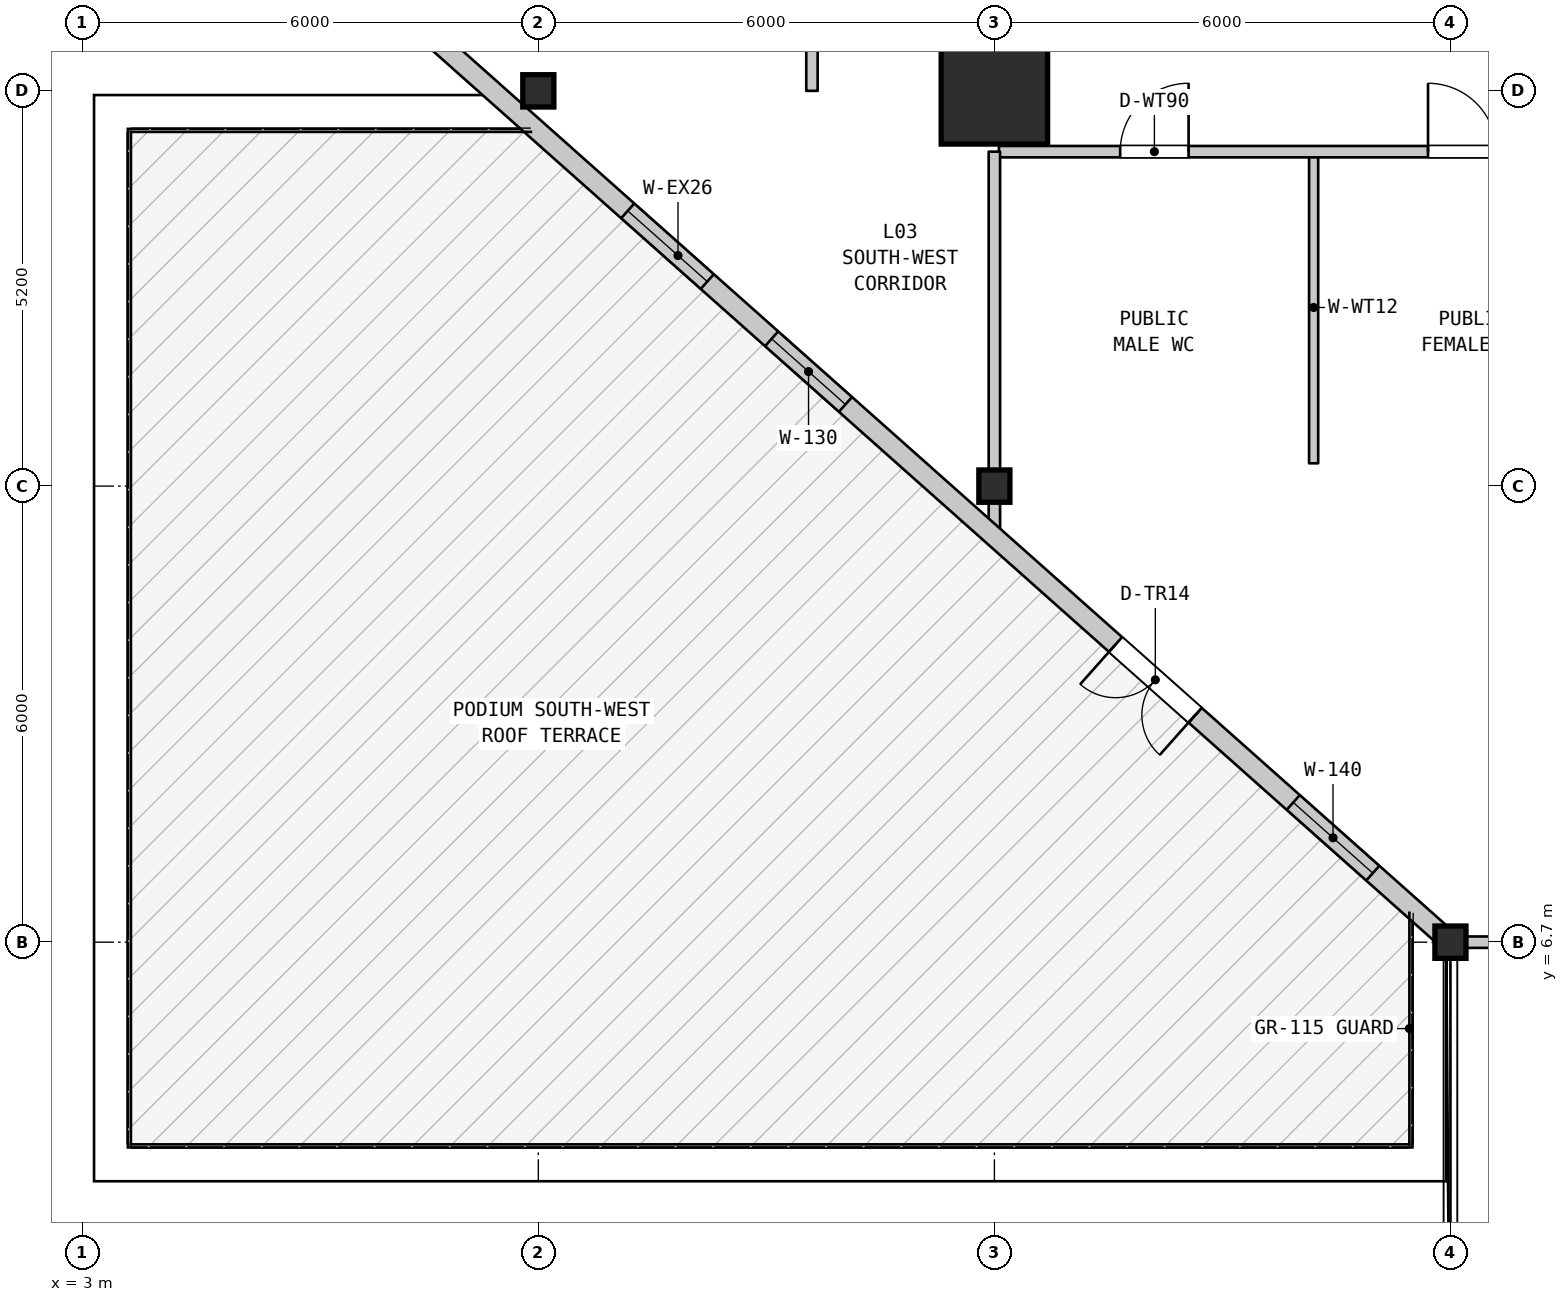
"""IFC4 building model, lengths in metres.
Left out: names, types, materials, properties, quantities, classifications, styles, units other than length and angle.
Written with IfcOpenShell. Run it as: python <this file> out.ifc"""

import sys

from ifc_helpers import new_model, si_unit, direction, frame, frame_2d, origin, origin_2d, place, context, subcontext, project, spatial, rectangle, i_section, extrude, element, fill, save


model = new_model("IFC4")
c1 = context("Model", 3, precision=1e-05, world=origin(), true_north=direction((0.0, 1.0)))
c2 = subcontext(c1, "Body", "Model", "MODEL_VIEW")
j1 = project(units=[si_unit("LENGTHUNIT", "METRE"), si_unit("PLANEANGLEUNIT", "RADIAN")], contexts=[c1])
p1 = place(None, origin())
s1 = spatial("IfcSite", under=j1, at=p1, CompositionType="ELEMENT")
p2 = place(p1, origin())
s2 = spatial("IfcBuilding", under=s1, at=p2, CompositionType="ELEMENT")
p3 = place(p2, frame((0.0, 0.0, 19.0)))
s3 = spatial("IfcBuildingStorey", under=s2, at=p3, CompositionType="ELEMENT", Elevation=19.0)
for number, where, z_axis, x_axis in (
    (1, (9.0, 17.9, 0.0), (0.0, 0.0, 1.0), (1.0, 0.0, 0.0)),
    (2, (15.0, 12.7, 0.0), (0.0, 0.0, 1.0), (1.0, 0.0, 0.0)),
):
    element("IfcColumn", number, at=place(p3, frame(where, z_axis=z_axis, x_axis=x_axis)), inside=s3, PredefinedType="COLUMN", context=c2, shape_type="SweptSolid", body=[
        extrude(i_section(OverallWidth=0.409, OverallDepth=0.425, WebThickness=0.032, FlangeThickness=0.052, FilletRadius=0.015, at=origin_2d()), origin(), (0.0, 0.0, 1.0), 5.0),
    ])
p4 = place(p3, frame((15.0, 17.9, 0.0), z_axis=(0.0, 0.0, 1.0), x_axis=(1.0, 0.0, 0.0)))
e3 = element("IfcColumn", 3, at=p4, inside=s3, PredefinedType="COLUMN", context=c2, shape_type="SweptSolid", body=[
    extrude(rectangle(XDim=1.4, YDim=1.4, at=origin_2d()), origin(), (0.0, 0.0, 1.0), 5.0),
])
p5 = place(p3, frame((21.0, 6.7, 0.0), z_axis=(0.0, 0.0, 1.0), x_axis=(1.0, 0.0, 0.0)))
e4 = element("IfcColumn", 4, at=p5, inside=s3, PredefinedType="COLUMN", context=c2, shape_type="SweptSolid", body=[
    extrude(i_section(OverallWidth=0.409, OverallDepth=0.425, WebThickness=0.032, FlangeThickness=0.052, FilletRadius=0.015, at=origin_2d()), origin(), (0.0, 0.0, 1.0), 5.0),
])
p6 = place(p3, frame((21.0, 6.7, 0.0), z_axis=(0.0, 0.0, 1.0), x_axis=(-0.747409318684, 0.66436383883, 0.0)))
e5 = element("IfcWall", 5, at=p6, inside=s3, PredefinedType="STANDARD", context=c2, shape_type="SweptSolid", body=[
    extrude(rectangle(XDim=4.495, YDim=0.26, at=frame_2d((2.248, 0.0))), origin(), (0.0, 0.0, 1.0), 4.285),
])
p7 = place(p6, frame((1.367, 0.0, 0.9)))
e6 = element("IfcOpeningElement", 6, at=p7, cuts=e5, PredefinedType="OPENING", context=c2, shape_type="SweptSolid", body=[
    extrude(rectangle(XDim=1.4, YDim=1.85, at=frame_2d((0.7, 0.925))), frame((0.0, 0.14, 0.0), z_axis=(0.0, -1.0, 0.0), x_axis=(1.0, 0.0, 0.0)), (0.0, 0.0, 1.0), 0.28),
])
p8 = place(p3, frame((12.6, 17.9, 0.0), z_axis=(0.0, 0.0, 1.0), x_axis=(0.0, 1.0, 0.0)))
e7 = element("IfcWall", 7, at=p8, inside=s3, PredefinedType="STANDARD", context=c2, shape_type="SweptSolid", body=[
    extrude(rectangle(XDim=20.0, YDim=0.15, at=frame_2d((10.0, 0.0))), origin(), (0.0, 0.0, 1.0), 4.685),
])
p9 = place(p8, frame((8.93, 0.0, 0.0)))
e8 = element("IfcOpeningElement", 8, at=p9, cuts=e7, PredefinedType="OPENING", context=c2, shape_type="SweptSolid", body=[
    extrude(rectangle(XDim=1.2, YDim=2.2, at=frame_2d((0.6, 1.1))), frame((0.0, 0.085, 0.0), z_axis=(0.0, -1.0, 0.0), x_axis=(1.0, 0.0, 0.0)), (0.0, 0.0, 1.0), 0.17),
])
p10 = place(p3, frame((15.0, 12.043, 0.0), z_axis=(0.0, 0.0, 1.0), x_axis=(0.0, 1.0, 0.0)))
e9 = element("IfcWall", 9, at=p10, inside=s3, PredefinedType="STANDARD", context=c2, shape_type="SweptSolid", body=[
    extrude(rectangle(XDim=0.657, YDim=0.15, at=frame_2d((0.329, 0.0))), origin(), (0.0, 0.0, 1.0), 4.685),
])
p11 = place(p3, frame((19.2, 13.0, 0.0), z_axis=(0.0, 0.0, 1.0), x_axis=(0.0, 1.0, 0.0)))
e10 = element("IfcWall", 10, at=p11, inside=s3, PredefinedType="PARTITIONING", context=c2, shape_type="SweptSolid", body=[
    extrude(rectangle(XDim=4.1, YDim=0.12, at=frame_2d((2.05, 0.0))), origin(), (0.0, 0.0, 1.0), 4.685),
])
p12 = place(p3, frame((21.01, 6.7, 0.0), z_axis=(0.0, 0.0, 1.0), x_axis=(1.0, 0.0, 0.0)))
e11 = element("IfcWall", 11, at=p12, inside=s3, PredefinedType="STANDARD", context=c2, shape_type="SweptSolid", body=[
    extrude(rectangle(XDim=11.93, YDim=0.15, at=frame_2d((5.965, 0.0))), origin(), (0.0, 0.0, 1.0), 4.185),
])
p13 = place(p12, frame((4.184, 0.0, 0.0)))
e12 = element("IfcOpeningElement", 12, at=p13, cuts=e11, PredefinedType="OPENING", context=c2, shape_type="SweptSolid", body=[
    extrude(rectangle(XDim=1.0, YDim=2.15, at=frame_2d((0.5, 1.075))), frame((0.0, 0.085, 0.0), z_axis=(0.0, -1.0, 0.0), x_axis=(1.0, 0.0, 0.0)), (0.0, 0.0, 1.0), 0.17),
])
p14 = place(p3, frame((15.06, 17.1, 0.0), z_axis=(0.0, 0.0, 1.0), x_axis=(1.0, 0.0, 0.0)))
e13 = element("IfcWall", 13, at=p14, inside=s3, PredefinedType="STANDARD", context=c2, shape_type="SweptSolid", body=[
    extrude(rectangle(XDim=8.295, YDim=0.15, at=frame_2d((4.147, 0.0))), origin(), (0.0, 0.0, 1.0), 4.685),
])
p15 = place(p14, frame((1.595, 0.0, 0.0)))
e14 = element("IfcOpeningElement", 14, at=p15, cuts=e13, PredefinedType="OPENING", context=c2, shape_type="SweptSolid", body=[
    extrude(rectangle(XDim=0.9, YDim=2.1, at=frame_2d((0.45, 1.05))), frame((0.0, 0.085, 0.0), z_axis=(0.0, -1.0, 0.0), x_axis=(1.0, 0.0, 0.0)), (0.0, 0.0, 1.0), 0.17),
])
p16 = place(p14, frame((5.645, 0.0, 0.0)))
e15 = element("IfcOpeningElement", 15, at=p16, cuts=e13, PredefinedType="OPENING", context=c2, shape_type="SweptSolid", body=[
    extrude(rectangle(XDim=0.9, YDim=2.1, at=frame_2d((0.45, 1.05))), frame((0.0, 0.085, 0.0), z_axis=(0.0, -1.0, 0.0), x_axis=(1.0, 0.0, 0.0)), (0.0, 0.0, 1.0), 0.17),
])
p17 = place(p3, frame((17.64, 9.686, 0.0), z_axis=(0.0, 0.0, 1.0), x_axis=(-0.747409318684, 0.66436383883, 0.0)))
e16 = element("IfcWall", 16, at=p17, inside=s3, PredefinedType="STANDARD", context=c2, shape_type="SweptSolid", body=[
    extrude(rectangle(XDim=18.204, YDim=0.26, at=frame_2d((9.102, 0.0))), origin(), (0.0, 0.0, 1.0), 4.685),
])
p18 = place(p17, origin())
e17 = element("IfcOpeningElement", 17, at=p18, cuts=e16, PredefinedType="OPENING", context=c2, shape_type="SweptSolid", body=[
    extrude(rectangle(XDim=1.4, YDim=2.2, at=frame_2d((0.7, 1.1))), frame((0.0, 0.14, 0.0), z_axis=(0.0, -1.0, 0.0), x_axis=(1.0, 0.0, 0.0)), (0.0, 0.0, 1.0), 0.28),
])
p19 = place(p17, frame((6.154, 0.0, 0.9)))
e18 = element("IfcOpeningElement", 18, at=p19, cuts=e16, PredefinedType="OPENING", context=c2, shape_type="SweptSolid", body=[
    extrude(rectangle(XDim=1.3, YDim=1.9, at=frame_2d((0.65, 0.95))), frame((0.0, 0.14, 0.0), z_axis=(0.0, -1.0, 0.0), x_axis=(1.0, 0.0, 0.0)), (0.0, 0.0, 1.0), 0.28),
])
p20 = place(p17, frame((8.587, 0.0, 0.9)))
e19 = element("IfcOpeningElement", 19, at=p20, cuts=e16, PredefinedType="OPENING", context=c2, shape_type="SweptSolid", body=[
    extrude(rectangle(XDim=1.4, YDim=1.85, at=frame_2d((0.7, 0.925))), frame((0.0, 0.14, 0.0), z_axis=(0.0, -1.0, 0.0), x_axis=(1.0, 0.0, 0.0)), (0.0, 0.0, 1.0), 0.28),
])
p21 = place(p17, frame((13.454, 0.0, 0.9)))
e20 = element("IfcOpeningElement", 20, at=p21, cuts=e16, PredefinedType="OPENING", context=c2, shape_type="SweptSolid", body=[
    extrude(rectangle(XDim=1.3, YDim=1.9, at=frame_2d((0.65, 0.95))), frame((0.0, 0.14, 0.0), z_axis=(0.0, -1.0, 0.0), x_axis=(1.0, 0.0, 0.0)), (0.0, 0.0, 1.0), 0.28),
])
p22 = place(p17, frame((15.887, 0.0, 0.9)))
e21 = element("IfcOpeningElement", 21, at=p22, cuts=e16, PredefinedType="OPENING", context=c2, shape_type="SweptSolid", body=[
    extrude(rectangle(XDim=1.4, YDim=1.85, at=frame_2d((0.7, 0.925))), frame((0.0, 0.14, 0.0), z_axis=(0.0, -1.0, 0.0), x_axis=(1.0, 0.0, 0.0)), (0.0, 0.0, 1.0), 0.28),
])
p23 = place(p3, frame((15.0, 12.7, 0.0), z_axis=(0.0, 0.0, 1.0), x_axis=(0.0, 1.0, 0.0)))
e22 = element("IfcWall", 22, at=p23, inside=s3, PredefinedType="STANDARD", context=c2, shape_type="SweptSolid", body=[
    extrude(rectangle(XDim=4.4, YDim=0.15, at=frame_2d((2.2, 0.0))), origin(), (0.0, 0.0, 1.0), 4.185),
])
p24 = place(p18, origin())
e23 = element("IfcDoor", 23, at=p24, inside=s3, OperationType="DOUBLE_DOOR_SINGLE_SWING", PredefinedType="DOOR", context=c2, shape_type="SweptSolid", body=[
    extrude(rectangle(XDim=1.4, YDim=2.2, at=frame_2d((0.7, 1.1))), frame((0.0, 0.025, 0.0), z_axis=(0.0, -1.0, 0.0), x_axis=(1.0, 0.0, 0.0)), (0.0, 0.0, 1.0), 0.05),
])
fill(e17, e23)
p25 = place(p7, origin())
e24 = element("IfcWindow", 24, at=p25, inside=s3, PartitioningType="SINGLE_PANEL", PredefinedType="WINDOW", context=c2, shape_type="SweptSolid", body=[
    extrude(rectangle(XDim=1.4, YDim=1.85, at=frame_2d((0.7, 0.925))), frame((0.0, 0.03, 0.0), z_axis=(0.0, -1.0, 0.0), x_axis=(1.0, 0.0, 0.0)), (0.0, 0.0, 1.0), 0.06),
])
fill(e6, e24)
p26 = place(p19, origin())
e25 = element("IfcWindow", 25, at=p26, inside=s3, PartitioningType="SINGLE_PANEL", PredefinedType="WINDOW", context=c2, shape_type="SweptSolid", body=[
    extrude(rectangle(XDim=1.3, YDim=1.9, at=frame_2d((0.65, 0.95))), frame((0.0, 0.03, 0.0), z_axis=(0.0, -1.0, 0.0), x_axis=(1.0, 0.0, 0.0)), (0.0, 0.0, 1.0), 0.06),
])
fill(e18, e25)
p27 = place(p20, origin())
e26 = element("IfcWindow", 26, at=p27, inside=s3, PartitioningType="SINGLE_PANEL", PredefinedType="WINDOW", context=c2, shape_type="SweptSolid", body=[
    extrude(rectangle(XDim=1.4, YDim=1.85, at=frame_2d((0.7, 0.925))), frame((0.0, 0.03, 0.0), z_axis=(0.0, -1.0, 0.0), x_axis=(1.0, 0.0, 0.0)), (0.0, 0.0, 1.0), 0.06),
])
fill(e19, e26)
p28 = place(p15, origin())
e27 = element("IfcDoor", 27, at=p28, inside=s3, OperationType="SINGLE_SWING_RIGHT", PredefinedType="DOOR", context=c2, shape_type="SweptSolid", body=[
    extrude(rectangle(XDim=0.9, YDim=2.1, at=frame_2d((0.45, 1.05))), frame((0.0, 0.025, 0.0), z_axis=(0.0, -1.0, 0.0), x_axis=(1.0, 0.0, 0.0)), (0.0, 0.0, 1.0), 0.05),
])
fill(e14, e27)
p29 = place(p16, origin())
e28 = element("IfcDoor", 28, at=p29, inside=s3, OperationType="SINGLE_SWING_LEFT", PredefinedType="DOOR", context=c2, shape_type="SweptSolid", body=[
    extrude(rectangle(XDim=0.9, YDim=2.1, at=frame_2d((0.45, 1.05))), frame((0.0, 0.025, 0.0), z_axis=(0.0, -1.0, 0.0), x_axis=(1.0, 0.0, 0.0)), (0.0, 0.0, 1.0), 0.05),
])
fill(e15, e28)
save(model, sys.argv[1])
